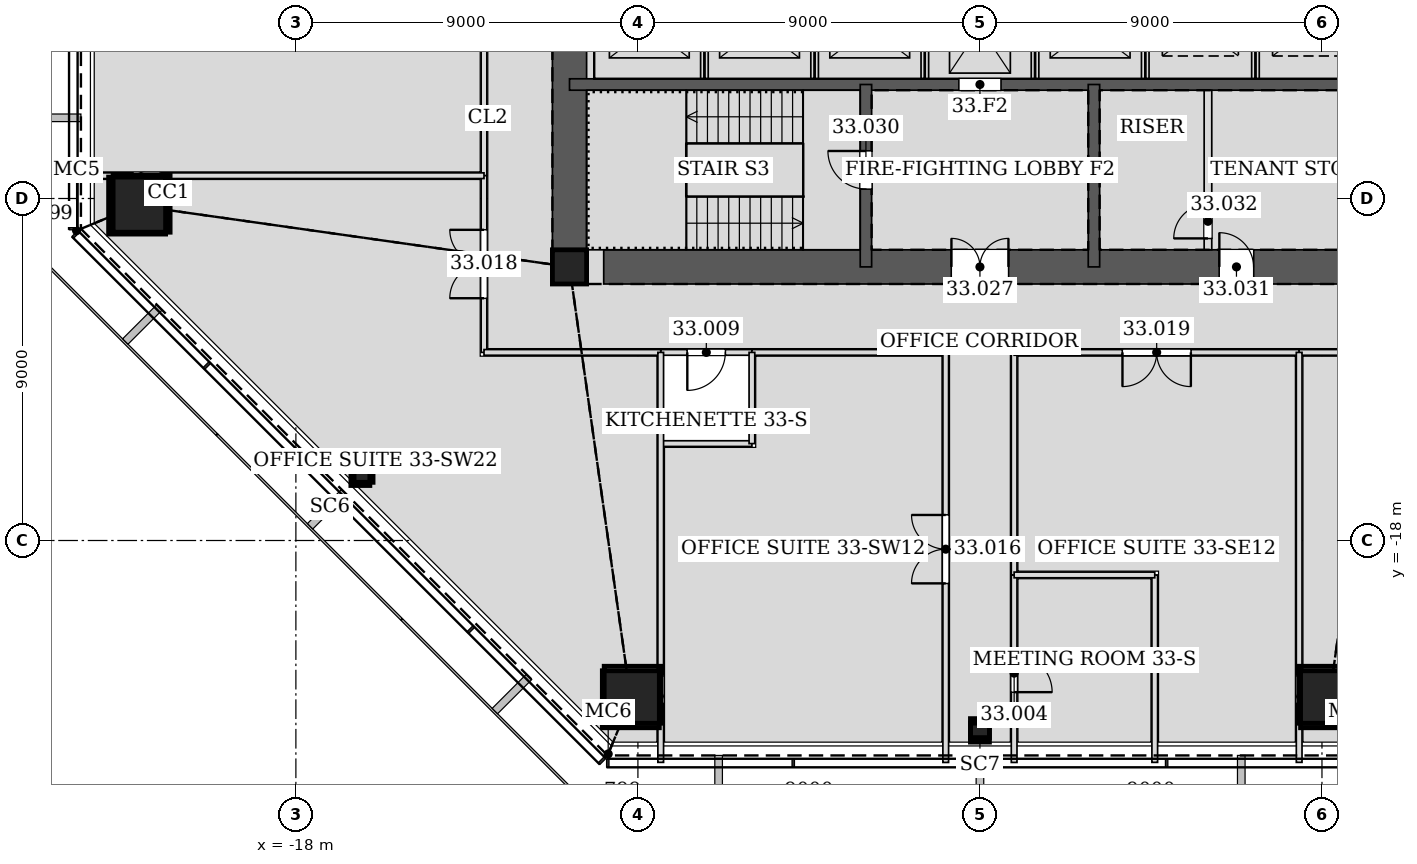
"""IFC4 building model, lengths in metres.
Left out: names, types, materials, properties, quantities, classifications, styles, units other than length and angle.
Written with IfcOpenShell. Run it as: python <this file> out.ifc"""

import sys

from ifc_helpers import new_model, si_unit, direction, frame, frame_2d, origin, origin_2d, place, context, subcontext, project, spatial, rectangle, hollow_rectangle, extrude, element, fill, save


model = new_model("IFC4")
c1 = context("Model", 3, precision=1e-05, world=origin(), true_north=direction((0.0, 1.0)))
c2 = subcontext(c1, "Body", "Model", "MODEL_VIEW")
j1 = project(units=[si_unit("LENGTHUNIT", "METRE"), si_unit("PLANEANGLEUNIT", "RADIAN")], contexts=[c1])
p1 = place(None, origin())
s1 = spatial("IfcSite", under=j1, at=p1, CompositionType="ELEMENT")
p2 = place(p1, origin())
s2 = spatial("IfcBuilding", under=s1, at=p2, CompositionType="ELEMENT")
p3 = place(p2, frame((0.0, 0.0, 147.0)))
s3 = spatial("IfcBuildingStorey", under=s2, at=p3, CompositionType="ELEMENT", Elevation=147.0)
for number, where, z_axis, x_axis in (
    (1, (-22.178, -9.187, 0.0), (0.028, 0.012, 1.0), (-0.384, 0.923, 0.0)),
    (2, (-9.187, -22.178, 0.0), (0.012, 0.028, 1.0), (-0.923, 0.384, 0.0)),
    (3, (9.187, -22.178, 0.0), (-0.012, 0.028, 1.0), (-0.923, -0.384, 0.0)),
):
    element("IfcColumn", number, at=place(p3, frame(where, z_axis=z_axis, x_axis=x_axis)), inside=s3, PredefinedType="COLUMN", context=c2, shape_type="SweptSolid", body=[
        extrude(hollow_rectangle(XDim=1.5, YDim=1.5, WallThickness=0.07, at=origin_2d()), origin(), (0.0, 0.0, 1.0), 4.202),
    ])
for number, where, z_axis, x_axis in (
    (4, (-16.303, -16.303, 0.0), (0.02, 0.02, 1.0), (-0.707, 0.707, 0.0)),
    (5, (0.0, -23.056, 0.0), (0.0, 0.028, 1.0), (-1.0, 0.0, 0.0)),
):
    element("IfcColumn", number, at=place(p3, frame(where, z_axis=z_axis, x_axis=x_axis)), inside=s3, PredefinedType="COLUMN", context=c2, shape_type="SweptSolid", body=[
        extrude(hollow_rectangle(XDim=0.5, YDim=0.5, WallThickness=0.025, at=origin_2d()), origin(), (0.0, 0.0, 1.0), 4.202),
    ])
p4 = place(p3, frame((-10.8, -10.8, 0.0), z_axis=(0.0, 0.0, 1.0), x_axis=(1.0, 0.0, 0.0)))
e6 = element("IfcColumn", 6, at=p4, inside=s3, PredefinedType="COLUMN", context=c2, shape_type="SweptSolid", body=[
    extrude(hollow_rectangle(XDim=0.9, YDim=0.9, WallThickness=0.06, at=origin_2d()), origin(), (0.0, 0.0, 1.0), 4.2),
])
p5 = place(p3, frame((-10.8, -10.8, 0.0), z_axis=(0.0, 0.0, 1.0), x_axis=(1.0, 0.0, 0.0)))
e7 = element("IfcWall", 7, at=p5, inside=s3, PredefinedType="SOLIDWALL", context=c2, shape_type="SweptSolid", body=[
    extrude(rectangle(XDim=21.6, YDim=0.9, at=frame_2d((10.8, 0.0))), origin(), (0.0, 0.0, 1.0), 4.2),
])
p6 = place(p5, frame((10.05, 0.0, 0.0)))
e8 = element("IfcOpeningElement", 8, at=p6, cuts=e7, PredefinedType="OPENING", context=c2, shape_type="SweptSolid", body=[
    extrude(rectangle(XDim=1.5, YDim=2.1, at=frame_2d((0.75, 1.05))), frame((0.0, 0.46, 0.0), z_axis=(0.0, -1.0, 0.0), x_axis=(1.0, 0.0, 0.0)), (0.0, 0.0, 1.0), 0.92),
])
p7 = place(p5, frame((17.1, 0.0, 0.0)))
e9 = element("IfcOpeningElement", 9, at=p7, cuts=e7, PredefinedType="OPENING", context=c2, shape_type="SweptSolid", body=[
    extrude(rectangle(XDim=0.9, YDim=2.1, at=frame_2d((0.45, 1.05))), frame((0.0, 0.46, 0.0), z_axis=(0.0, -1.0, 0.0), x_axis=(1.0, 0.0, 0.0)), (0.0, 0.0, 1.0), 0.92),
])
p8 = place(p3, frame((-10.8, 10.8, 0.0), z_axis=(0.0, 0.0, 1.0), x_axis=(0.0, -1.0, 0.0)))
e10 = element("IfcWall", 10, at=p8, inside=s3, PredefinedType="SOLIDWALL", context=c2, shape_type="SweptSolid", body=[
    extrude(rectangle(XDim=21.6, YDim=0.9, at=frame_2d((10.8, 0.0))), origin(), (0.0, 0.0, 1.0), 4.2),
])
p9 = place(p8, frame((8.7, 0.0, 0.0)))
e11 = element("IfcOpeningElement", 11, at=p9, cuts=e10, PredefinedType="OPENING", context=c2, shape_type="SweptSolid", body=[
    extrude(rectangle(XDim=1.2, YDim=2.1, at=frame_2d((0.6, 1.05))), frame((0.0, 0.46, 0.0), z_axis=(0.0, -1.0, 0.0), x_axis=(1.0, 0.0, 0.0)), (0.0, 0.0, 1.0), 0.92),
])
p10 = place(p8, frame((11.7, 0.0, 0.0)))
e12 = element("IfcOpeningElement", 12, at=p10, cuts=e10, PredefinedType="OPENING", context=c2, shape_type="SweptSolid", body=[
    extrude(rectangle(XDim=1.2, YDim=2.1, at=frame_2d((0.6, 1.05))), frame((0.0, 0.46, 0.0), z_axis=(0.0, -1.0, 0.0), x_axis=(1.0, 0.0, 0.0)), (0.0, 0.0, 1.0), 0.92),
])
p11 = place(p3, frame((-10.8, -6.0, 0.0), z_axis=(0.0, 0.0, 1.0), x_axis=(1.0, 0.0, 0.0)))
e13 = element("IfcWall", 13, at=p11, inside=s3, PredefinedType="SOLIDWALL", context=c2, shape_type="SweptSolid", body=[
    extrude(rectangle(XDim=21.6, YDim=0.3, at=frame_2d((10.8, 0.0))), origin(), (0.0, 0.0, 1.0), 4.2),
])
p12 = place(p11, frame((10.25, 0.0, 0.0)))
e14 = element("IfcOpeningElement", 14, at=p12, cuts=e13, PredefinedType="OPENING", context=c2, shape_type="SweptSolid", body=[
    extrude(rectangle(XDim=1.1, YDim=2.1, at=frame_2d((0.55, 1.05))), frame((0.0, 0.16, 0.0), z_axis=(0.0, -1.0, 0.0), x_axis=(1.0, 0.0, 0.0)), (0.0, 0.0, 1.0), 0.32),
])
p13 = place(p3, frame((-3.0, -6.0, 0.0), z_axis=(0.0, 0.0, 1.0), x_axis=(0.0, -1.0, 0.0)))
e15 = element("IfcWall", 15, at=p13, inside=s3, PredefinedType="SOLIDWALL", context=c2, shape_type="SweptSolid", body=[
    extrude(rectangle(XDim=4.8, YDim=0.3, at=frame_2d((2.4, 0.0))), origin(), (0.0, 0.0, 1.0), 4.2),
])
p14 = place(p13, frame((1.75, 0.0, 0.0)))
e16 = element("IfcOpeningElement", 16, at=p14, cuts=e15, PredefinedType="OPENING", context=c2, shape_type="SweptSolid", body=[
    extrude(rectangle(XDim=1.0, YDim=2.1, at=frame_2d((0.5, 1.05))), frame((0.0, 0.16, 0.0), z_axis=(0.0, -1.0, 0.0), x_axis=(1.0, 0.0, 0.0)), (0.0, 0.0, 1.0), 0.32),
])
p15 = place(p3, frame((3.0, -6.0, 0.0), z_axis=(0.0, 0.0, 1.0), x_axis=(0.0, -1.0, 0.0)))
e17 = element("IfcWall", 17, at=p15, inside=s3, PredefinedType="SOLIDWALL", context=c2, shape_type="SweptSolid", body=[
    extrude(rectangle(XDim=4.8, YDim=0.3, at=frame_2d((2.4, 0.0))), origin(), (0.0, 0.0, 1.0), 4.2),
])
p16 = place(p3, frame((0.9, -23.84, 0.0), z_axis=(0.0, 0.0, 1.0), x_axis=(0.0, 1.0, 0.0)))
e18 = element("IfcWall", 18, at=p16, inside=s3, PredefinedType="PARTITIONING", context=c2, shape_type="SweptSolid", body=[
    extrude(rectangle(XDim=4.935, YDim=0.15, at=frame_2d((2.468, 0.0))), origin(), (0.0, 0.0, 1.0), 3.426),
])
p17 = place(p16, frame((1.85, 0.0, 0.0)))
e19 = element("IfcOpeningElement", 19, at=p17, cuts=e18, PredefinedType="OPENING", context=c2, shape_type="SweptSolid", body=[
    extrude(rectangle(XDim=1.0, YDim=2.1, at=frame_2d((0.5, 1.05))), frame((0.0, 0.085, 0.0), z_axis=(0.0, -1.0, 0.0), x_axis=(1.0, 0.0, 0.0)), (0.0, 0.0, 1.0), 0.17),
])
p18 = place(p3, frame((-8.401, -13.05, 0.0), z_axis=(0.0, 0.0, 1.0), x_axis=(1.0, 0.0, 0.0)))
e20 = element("IfcWall", 20, at=p18, inside=s3, PredefinedType="PARTITIONING", context=c2, shape_type="SweptSolid", body=[
    extrude(rectangle(XDim=2.402, YDim=0.15, at=frame_2d((1.201, 0.0))), origin(), (0.0, 0.0, 1.0), 4.035),
])
p19 = place(p18, frame((0.701, 0.0, 0.0)))
e21 = element("IfcOpeningElement", 21, at=p19, cuts=e20, PredefinedType="OPENING", context=c2, shape_type="SweptSolid", body=[
    extrude(rectangle(XDim=1.0, YDim=2.1, at=frame_2d((0.5, 1.05))), frame((0.0, 0.085, 0.0), z_axis=(0.0, -1.0, 0.0), x_axis=(1.0, 0.0, 0.0)), (0.0, 0.0, 1.0), 0.17),
])
p20 = place(p3, frame((-6.001, -13.05, 0.0), z_axis=(0.0, 0.0, 1.0), x_axis=(1.0, 0.0, 0.0)))
e22 = element("IfcWall", 22, at=p20, inside=s3, PredefinedType="PARTITIONING", context=c2, shape_type="SweptSolid", body=[
    extrude(rectangle(XDim=5.101, YDim=0.15, at=frame_2d((2.551, 0.0))), origin(), (0.0, 0.0, 1.0), 4.035),
])
p21 = place(p3, frame((-0.9, -13.05, 0.0), z_axis=(0.0, 0.0, 1.0), x_axis=(0.0, -1.0, 0.0)))
e23 = element("IfcWall", 23, at=p21, inside=s3, PredefinedType="PARTITIONING", context=c2, shape_type="SweptSolid", body=[
    extrude(rectangle(XDim=10.79, YDim=0.15, at=frame_2d((5.395, 0.0))), origin(), (0.0, 0.0, 1.0), 3.426),
])
p22 = place(p21, frame((4.278, 0.0, 0.0)))
e24 = element("IfcOpeningElement", 24, at=p22, cuts=e23, PredefinedType="OPENING", context=c2, shape_type="SweptSolid", body=[
    extrude(rectangle(XDim=1.8, YDim=2.4, at=frame_2d((0.9, 1.2))), frame((0.0, 0.085, 0.0), z_axis=(0.0, -1.0, 0.0), x_axis=(1.0, 0.0, 0.0)), (0.0, 0.0, 1.0), 0.17),
])
p23 = place(p3, frame((-13.05, -0.9, 0.0), z_axis=(0.0, 0.0, 1.0), x_axis=(0.0, -1.0, 0.0)))
e25 = element("IfcWall", 25, at=p23, inside=s3, PredefinedType="PARTITIONING", context=c2, shape_type="SweptSolid", body=[
    extrude(rectangle(XDim=7.501, YDim=0.15, at=frame_2d((3.75, 0.0))), origin(), (0.0, 0.0, 1.0), 4.035),
])
p24 = place(p3, frame((-13.05, -8.399, 0.0), z_axis=(0.0, 0.0, 1.0), x_axis=(0.0, -1.0, 0.0)))
e26 = element("IfcWall", 26, at=p24, inside=s3, PredefinedType="PARTITIONING", context=c2, shape_type="SweptSolid", body=[
    extrude(rectangle(XDim=4.651, YDim=0.15, at=frame_2d((2.326, 0.0))), origin(), (0.0, 0.0, 1.0), 3.098),
])
p25 = place(p24, frame((1.426, 0.0, 0.0)))
e27 = element("IfcOpeningElement", 27, at=p25, cuts=e26, PredefinedType="OPENING", context=c2, shape_type="SweptSolid", body=[
    extrude(rectangle(XDim=1.8, YDim=2.4, at=frame_2d((0.9, 1.2))), frame((0.0, 0.085, 0.0), z_axis=(0.0, -1.0, 0.0), x_axis=(1.0, 0.0, 0.0)), (0.0, 0.0, 1.0), 0.17),
])
p26 = place(p3, frame((-13.05, -13.05, 0.0), z_axis=(0.0, 0.0, 1.0), x_axis=(1.0, 0.0, 0.0)))
e28 = element("IfcWall", 28, at=p26, inside=s3, PredefinedType="PARTITIONING", context=c2, shape_type="SweptSolid", body=[
    extrude(rectangle(XDim=4.651, YDim=0.15, at=frame_2d((2.326, 0.0))), origin(), (0.0, 0.0, 1.0), 3.098),
])
p27 = place(p3, frame((0.9, -18.907, 0.0), z_axis=(0.0, 0.0, 1.0), x_axis=(0.0, 1.0, 0.0)))
e29 = element("IfcWall", 29, at=p27, inside=s3, PredefinedType="PARTITIONING", context=c2, shape_type="SweptSolid", body=[
    extrude(rectangle(XDim=5.857, YDim=0.15, at=frame_2d((2.929, 0.0))), origin(), (0.0, 0.0, 1.0), 3.426),
])
p28 = place(p3, frame((0.9, -13.05, 0.0), z_axis=(0.0, 0.0, 1.0), x_axis=(1.0, 0.0, 0.0)))
e30 = element("IfcWall", 30, at=p28, inside=s3, PredefinedType="PARTITIONING", context=c2, shape_type="SweptSolid", body=[
    extrude(rectangle(XDim=7.501, YDim=0.15, at=frame_2d((3.75, 0.0))), origin(), (0.0, 0.0, 1.0), 4.035),
])
p29 = place(p28, frame((2.851, 0.0, 0.0)))
e31 = element("IfcOpeningElement", 31, at=p29, cuts=e30, PredefinedType="OPENING", context=c2, shape_type="SweptSolid", body=[
    extrude(rectangle(XDim=1.8, YDim=2.4, at=frame_2d((0.9, 1.2))), frame((0.0, 0.085, 0.0), z_axis=(0.0, -1.0, 0.0), x_axis=(1.0, 0.0, 0.0)), (0.0, 0.0, 1.0), 0.17),
])
p30 = place(p3, frame((8.399, -13.05, 0.0), z_axis=(0.0, 0.0, 1.0), x_axis=(1.0, 0.0, 0.0)))
e32 = element("IfcWall", 32, at=p30, inside=s3, PredefinedType="PARTITIONING", context=c2, shape_type="SweptSolid", body=[
    extrude(rectangle(XDim=4.651, YDim=0.15, at=frame_2d((2.326, 0.0))), origin(), (0.0, 0.0, 1.0), 3.098),
])
p31 = place(p30, frame((1.426, 0.0, 0.0)))
e33 = element("IfcOpeningElement", 33, at=p31, cuts=e32, PredefinedType="OPENING", context=c2, shape_type="SweptSolid", body=[
    extrude(rectangle(XDim=1.8, YDim=2.4, at=frame_2d((0.9, 1.2))), frame((0.0, 0.085, 0.0), z_axis=(0.0, -1.0, 0.0), x_axis=(1.0, 0.0, 0.0)), (0.0, 0.0, 1.0), 0.17),
])
p32 = place(p3, frame((4.6, -23.838, 0.0), z_axis=(0.0, 0.0, 1.0), x_axis=(0.0, 1.0, 0.0)))
e34 = element("IfcWall", 34, at=p32, inside=s3, PredefinedType="PARTITIONING", context=c2, shape_type="SweptSolid", body=[
    extrude(rectangle(XDim=4.932, YDim=0.15, at=frame_2d((2.466, 0.0))), origin(), (0.0, 0.0, 1.0), 3.426),
])
p33 = place(p3, frame((4.6, -18.906, 0.0), z_axis=(0.0, 0.0, 1.0), x_axis=(-1.0, 0.0, 0.0)))
e35 = element("IfcWall", 35, at=p33, inside=s3, PredefinedType="PARTITIONING", context=c2, shape_type="SweptSolid", body=[
    extrude(rectangle(XDim=3.7, YDim=0.15, at=frame_2d((1.85, 0.0))), origin(), (0.0, 0.0, 1.0), 4.035),
])
p34 = place(p3, frame((-8.4, -15.45, 0.0), z_axis=(0.0, 0.0, 1.0), x_axis=(1.0, 0.0, 0.0)))
e36 = element("IfcWall", 36, at=p34, inside=s3, PredefinedType="PARTITIONING", context=c2, shape_type="SweptSolid", body=[
    extrude(rectangle(XDim=2.4, YDim=0.15, at=frame_2d((1.2, 0.0))), origin(), (0.0, 0.0, 1.0), 4.035),
])
p35 = place(p3, frame((-6.0, -15.45, 0.0), z_axis=(0.0, 0.0, 1.0), x_axis=(0.0, 1.0, 0.0)))
e37 = element("IfcWall", 37, at=p35, inside=s3, PredefinedType="PARTITIONING", context=c2, shape_type="SweptSolid", body=[
    extrude(rectangle(XDim=2.4, YDim=0.15, at=frame_2d((1.2, 0.0))), origin(), (0.0, 0.0, 1.0), 3.426),
])
p36 = place(p3, frame((-8.4, -13.05, 0.0), z_axis=(0.0, 0.0, 1.0), x_axis=(0.0, -1.0, 0.0)))
e38 = element("IfcWall", 38, at=p36, inside=s3, PredefinedType="PARTITIONING", context=c2, shape_type="SweptSolid", body=[
    extrude(rectangle(XDim=8.482, YDim=0.15, at=frame_2d((4.241, 0.0))), origin(), (0.0, 0.0, 1.0), 3.426),
])
for number, where, z_axis, x_axis in (
    (39, (-8.4, -22.289, 0.0), (0.0, 0.0, 1.0), (0.0, -1.0, 0.0)),
    (40, (-23.838, -8.4, 0.0), (0.0, 0.0, 1.0), (1.0, 0.0, 0.0)),
):
    element("IfcWall", number, at=place(p3, frame(where, z_axis=z_axis, x_axis=x_axis)), inside=s3, PredefinedType="PARTITIONING", context=c2, shape_type="SweptSolid", body=[
        extrude(rectangle(XDim=1.55, YDim=0.15, at=frame_2d((0.775, 0.0))), origin(), (0.0, 0.0, 1.0), 4.035),
    ])
p37 = place(p3, frame((-21.532, -8.4, 0.0), z_axis=(0.0, 0.0, 1.0), x_axis=(1.0, 0.0, 0.0)))
e41 = element("IfcWall", 41, at=p37, inside=s3, PredefinedType="PARTITIONING", context=c2, shape_type="SweptSolid", body=[
    extrude(rectangle(XDim=8.482, YDim=0.15, at=frame_2d((4.241, 0.0))), origin(), (0.0, 0.0, 1.0), 3.426),
])
p38 = place(p3, frame((8.4, -23.838, 0.0), z_axis=(0.0, 0.0, 1.0), x_axis=(0.0, 1.0, 0.0)))
e42 = element("IfcWall", 42, at=p38, inside=s3, PredefinedType="PARTITIONING", context=c2, shape_type="SweptSolid", body=[
    extrude(rectangle(XDim=1.55, YDim=0.15, at=frame_2d((0.775, 0.0))), origin(), (0.0, 0.0, 1.0), 4.035),
])
p39 = place(p3, frame((8.4, -21.532, 0.0), z_axis=(0.0, 0.0, 1.0), x_axis=(0.0, 1.0, 0.0)))
e43 = element("IfcWall", 43, at=p39, inside=s3, PredefinedType="PARTITIONING", context=c2, shape_type="SweptSolid", body=[
    extrude(rectangle(XDim=8.482, YDim=0.15, at=frame_2d((4.241, 0.0))), origin(), (0.0, 0.0, 1.0), 3.426),
])
for number, where, z_axis, x_axis in (
    (44, (-7.25, -5.85, 0.0), (0.0, 0.0, 1.0), (0.0, 1.0, 0.0)),
    (45, (-4.35, -5.85, 0.0), (0.0, 0.0, 1.0), (0.0, 1.0, 0.0)),
    (46, (-1.45, -5.85, 0.0), (0.0, 0.0, 1.0), (0.0, 1.0, 0.0)),
    (47, (1.45, -5.85, 0.0), (0.0, 0.0, 1.0), (0.0, 1.0, 0.0)),
    (48, (4.35, -5.85, 0.0), (0.0, 0.0, 1.0), (0.0, 1.0, 0.0)),
    (49, (7.25, -5.85, 0.0), (0.0, 0.0, 1.0), (0.0, 1.0, 0.0)),
):
    element("IfcWall", number, at=place(p3, frame(where, z_axis=z_axis, x_axis=x_axis)), inside=s3, PredefinedType="PARTITIONING", context=c2, shape_type="SweptSolid", body=[
        extrude(rectangle(XDim=2.7, YDim=0.2, at=frame_2d((1.35, 0.0))), origin(), (0.0, 0.0, 1.0), 4.2),
    ])
p40 = place(p3, frame((6.0, -10.35, 0.0), z_axis=(0.0, 0.0, 1.0), x_axis=(0.0, 1.0, 0.0)))
e50 = element("IfcWall", 50, at=p40, inside=s3, PredefinedType="PARTITIONING", context=c2, shape_type="SweptSolid", body=[
    extrude(rectangle(XDim=4.2, YDim=0.2, at=frame_2d((2.1, 0.0))), origin(), (0.0, 0.0, 1.0), 4.035),
])
p41 = place(p40, frame((0.3, 0.0, 0.0)))
e51 = element("IfcOpeningElement", 51, at=p41, cuts=e50, PredefinedType="OPENING", context=c2, shape_type="SweptSolid", body=[
    extrude(rectangle(XDim=0.9, YDim=2.1, at=frame_2d((0.45, 1.05))), frame((0.0, 0.11, 0.0), z_axis=(0.0, -1.0, 0.0), x_axis=(1.0, 0.0, 0.0)), (0.0, 0.0, 1.0), 0.22),
])
p42 = place(p17, frame((1.0, 0.0, 0.0), z_axis=(0.0, 0.0, 1.0), x_axis=(-1.0, 0.0, 0.0)))
e52 = element("IfcDoor", 52, at=p42, inside=s3, OperationType="SINGLE_SWING_RIGHT", PredefinedType="DOOR", context=c2, shape_type="SweptSolid", body=[
    extrude(rectangle(XDim=1.0, YDim=2.1, at=frame_2d((0.5, 1.05))), frame((0.0, 0.025, 0.0), z_axis=(0.0, -1.0, 0.0), x_axis=(1.0, 0.0, 0.0)), (0.0, 0.0, 1.0), 0.05),
])
fill(e19, e52)
p43 = place(p19, frame((1.0, 0.0, 0.0), z_axis=(0.0, 0.0, 1.0), x_axis=(-1.0, 0.0, 0.0)))
e53 = element("IfcDoor", 53, at=p43, inside=s3, OperationType="SINGLE_SWING_RIGHT", PredefinedType="DOOR", context=c2, shape_type="SweptSolid", body=[
    extrude(rectangle(XDim=1.0, YDim=2.1, at=frame_2d((0.5, 1.05))), frame((0.0, 0.025, 0.0), z_axis=(0.0, -1.0, 0.0), x_axis=(1.0, 0.0, 0.0)), (0.0, 0.0, 1.0), 0.05),
])
fill(e21, e53)
p44 = place(p22, frame((1.8, 0.0, 0.0), z_axis=(0.0, 0.0, 1.0), x_axis=(-1.0, 0.0, 0.0)))
e54 = element("IfcDoor", 54, at=p44, inside=s3, OperationType="DOUBLE_DOOR_SINGLE_SWING", PredefinedType="DOOR", context=c2, shape_type="SweptSolid", body=[
    extrude(rectangle(XDim=1.8, YDim=2.4, at=frame_2d((0.9, 1.2))), frame((0.0, 0.025, 0.0), z_axis=(0.0, -1.0, 0.0), x_axis=(1.0, 0.0, 0.0)), (0.0, 0.0, 1.0), 0.05),
])
fill(e24, e54)
p45 = place(p25, frame((1.8, 0.0, 0.0), z_axis=(0.0, 0.0, 1.0), x_axis=(-1.0, 0.0, 0.0)))
e55 = element("IfcDoor", 55, at=p45, inside=s3, OperationType="DOUBLE_DOOR_SINGLE_SWING", PredefinedType="DOOR", context=c2, shape_type="SweptSolid", body=[
    extrude(rectangle(XDim=1.8, YDim=2.4, at=frame_2d((0.9, 1.2))), frame((0.0, 0.025, 0.0), z_axis=(0.0, -1.0, 0.0), x_axis=(1.0, 0.0, 0.0)), (0.0, 0.0, 1.0), 0.05),
])
fill(e27, e55)
p46 = place(p29, frame((1.8, 0.0, 0.0), z_axis=(0.0, 0.0, 1.0), x_axis=(-1.0, 0.0, 0.0)))
e56 = element("IfcDoor", 56, at=p46, inside=s3, OperationType="DOUBLE_DOOR_SINGLE_SWING", PredefinedType="DOOR", context=c2, shape_type="SweptSolid", body=[
    extrude(rectangle(XDim=1.8, YDim=2.4, at=frame_2d((0.9, 1.2))), frame((0.0, 0.025, 0.0), z_axis=(0.0, -1.0, 0.0), x_axis=(1.0, 0.0, 0.0)), (0.0, 0.0, 1.0), 0.05),
])
fill(e31, e56)
p47 = place(p6, origin())
e57 = element("IfcDoor", 57, at=p47, inside=s3, OperationType="DOUBLE_DOOR_SINGLE_SWING", PredefinedType="DOOR", context=c2, shape_type="SweptSolid", body=[
    extrude(rectangle(XDim=1.5, YDim=2.1, at=frame_2d((0.75, 1.05))), frame((0.0, 0.025, 0.0), z_axis=(0.0, -1.0, 0.0), x_axis=(1.0, 0.0, 0.0)), (0.0, 0.0, 1.0), 0.05),
])
fill(e8, e57)
p48 = place(p14, frame((1.0, 0.0, 0.0), z_axis=(0.0, 0.0, 1.0), x_axis=(-1.0, 0.0, 0.0)))
e58 = element("IfcDoor", 58, at=p48, inside=s3, OperationType="SINGLE_SWING_RIGHT", PredefinedType="DOOR", context=c2, shape_type="SweptSolid", body=[
    extrude(rectangle(XDim=1.0, YDim=2.1, at=frame_2d((0.5, 1.05))), frame((0.0, 0.025, 0.0), z_axis=(0.0, -1.0, 0.0), x_axis=(1.0, 0.0, 0.0)), (0.0, 0.0, 1.0), 0.05),
])
fill(e16, e58)
p49 = place(p7, origin())
e59 = element("IfcDoor", 59, at=p49, inside=s3, OperationType="SINGLE_SWING_LEFT", PredefinedType="DOOR", context=c2, shape_type="SweptSolid", body=[
    extrude(rectangle(XDim=0.9, YDim=2.1, at=frame_2d((0.45, 1.05))), frame((0.0, 0.025, 0.0), z_axis=(0.0, -1.0, 0.0), x_axis=(1.0, 0.0, 0.0)), (0.0, 0.0, 1.0), 0.05),
])
fill(e9, e59)
p50 = place(p41, origin())
e60 = element("IfcDoor", 60, at=p50, inside=s3, OperationType="SINGLE_SWING_LEFT", PredefinedType="DOOR", context=c2, shape_type="SweptSolid", body=[
    extrude(rectangle(XDim=0.9, YDim=2.1, at=frame_2d((0.45, 1.05))), frame((0.0, 0.025, 0.0), z_axis=(0.0, -1.0, 0.0), x_axis=(1.0, 0.0, 0.0)), (0.0, 0.0, 1.0), 0.05),
])
fill(e51, e60)
p51 = place(p12, origin())
e61 = element("IfcDoor", 61, at=p51, inside=s3, OperationType="DOUBLE_DOOR_SLIDING", PredefinedType="DOOR", context=c2, shape_type="SweptSolid", body=[
    extrude(rectangle(XDim=1.1, YDim=2.1, at=frame_2d((0.55, 1.05))), frame((0.0, 0.025, 0.0), z_axis=(0.0, -1.0, 0.0), x_axis=(1.0, 0.0, 0.0)), (0.0, 0.0, 1.0), 0.05),
])
fill(e14, e61)
save(model, sys.argv[1])
